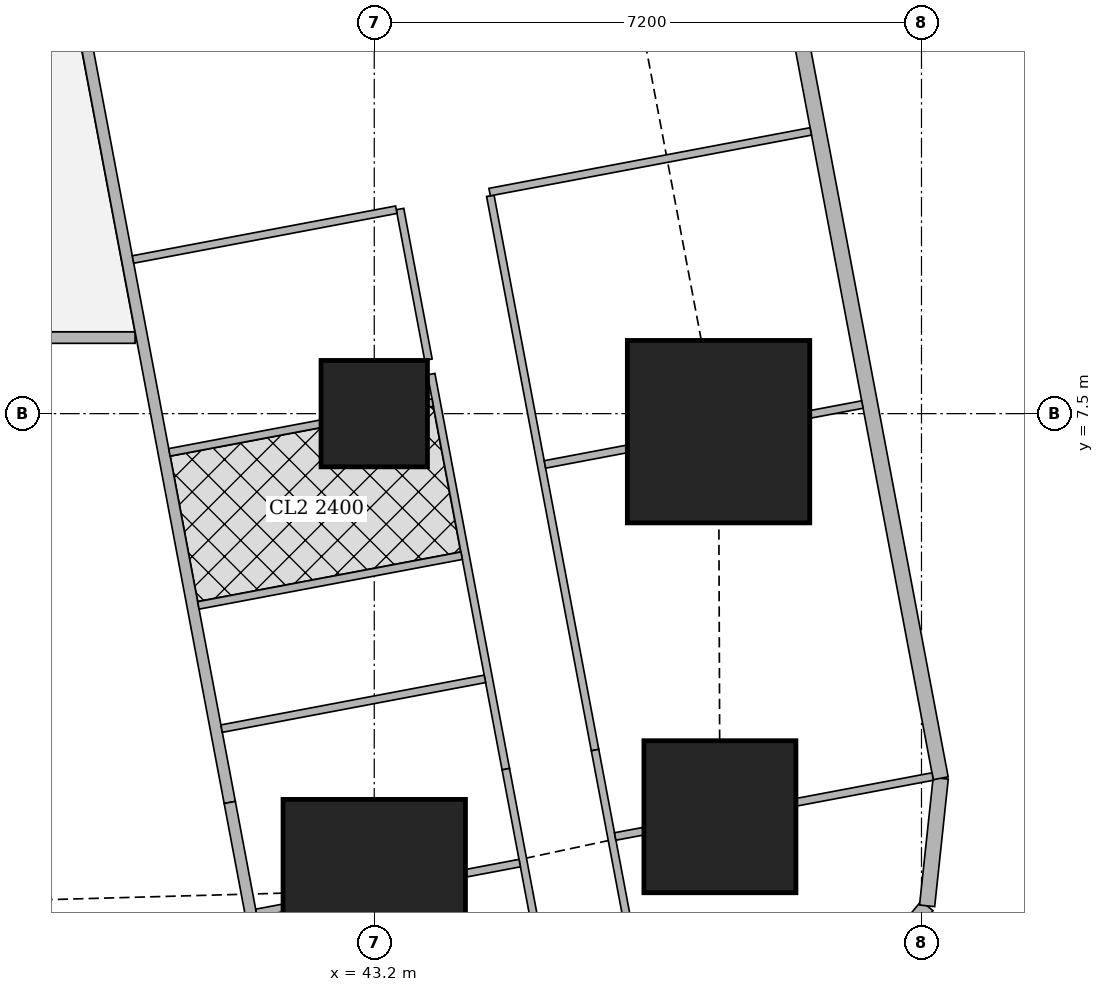
"""IFC4 building model, lengths in metres.
Left out: names, types, materials, properties, quantities, classifications, styles, units other than length and angle.
Written with IfcOpenShell. Run it as: python <this file> out.ifc"""

import sys

from ifc_helpers import new_model, si_unit, direction, frame, frame_2d, origin, origin_2d, place, context, subcontext, project, spatial, rectangle, extrude, element, fill, save


model = new_model("IFC4")
c1 = context("Model", 3, precision=1e-05, world=origin(), true_north=direction((0.0, 1.0)))
c2 = subcontext(c1, "Body", "Model", "MODEL_VIEW")
j1 = project(units=[si_unit("LENGTHUNIT", "METRE"), si_unit("PLANEANGLEUNIT", "RADIAN")], contexts=[c1])
p1 = place(None, origin())
s1 = spatial("IfcSite", under=j1, at=p1, CompositionType="ELEMENT")
p2 = place(p1, origin())
s2 = spatial("IfcBuilding", under=s1, at=p2, CompositionType="ELEMENT")
p3 = place(p2, frame((0.0, 0.0, 204.95)))
s3 = spatial("IfcBuildingStorey", under=s2, at=p3, CompositionType="ELEMENT", Elevation=204.95)
p4 = place(p3, frame((43.2, 1.225, 0.0), z_axis=(0.0, 0.0, 1.0), x_axis=(1.0, 0.0, 0.0)))
e1 = element("IfcColumn", 1, at=p4, inside=s3, PredefinedType="COLUMN", context=c2, shape_type="SweptSolid", body=[
    extrude(rectangle(XDim=2.4, YDim=2.4, at=origin_2d()), origin(), (0.0, 0.0, 1.0), 3.75),
])
p5 = place(p3, frame((47.748, 2.197, 0.0), z_axis=(0.0, 0.0, 1.0), x_axis=(1.0, 0.0, 0.0)))
e2 = element("IfcColumn", 2, at=p5, inside=s3, PredefinedType="COLUMN", context=c2, shape_type="SweptSolid", body=[
    extrude(rectangle(XDim=2.0, YDim=2.0, at=origin_2d()), origin(), (0.0, 0.0, 1.0), 3.75),
])
p6 = place(p3, frame((43.2, 7.5, 0.0), z_axis=(0.0, 0.0, 1.0), x_axis=(1.0, 0.0, 0.0)))
e3 = element("IfcColumn", 3, at=p6, inside=s3, PredefinedType="COLUMN", context=c2, shape_type="SweptSolid", body=[
    extrude(rectangle(XDim=1.4, YDim=1.4, at=origin_2d()), origin(), (0.0, 0.0, 1.0), 3.75),
])
p7 = place(p3, frame((47.73, 7.263, 0.0), z_axis=(0.0, 0.0, 1.0), x_axis=(1.0, 0.0, 0.0)))
e4 = element("IfcColumn", 4, at=p7, inside=s3, PredefinedType="COLUMN", context=c2, shape_type="SweptSolid", body=[
    extrude(rectangle(XDim=2.4, YDim=2.4, at=origin_2d()), origin(), (0.0, 0.0, 1.0), 3.75),
])
p8 = place(p3, frame((49.407, -0.263, 0.0), z_axis=(0.0, 0.0, 1.0), x_axis=(0.638042593423, 0.770001070764, 0.0)))
e5 = element("IfcWall", 5, at=p8, inside=s3, PredefinedType="SOLIDWALL", context=c2, shape_type="SweptSolid", body=[
    extrude(rectangle(XDim=1.673, YDim=0.2, at=frame_2d((0.836, 0.0))), origin(), (0.0, 0.0, 1.0), 3.5),
])
p9 = place(p3, frame((50.474, 1.025, 0.0), z_axis=(0.0, 0.0, 1.0), x_axis=(0.106047815515, 0.994361031429, 0.0)))
e6 = element("IfcWall", 6, at=p9, inside=s3, PredefinedType="SOLIDWALL", context=c2, shape_type="SweptSolid", body=[
    extrude(rectangle(XDim=1.688, YDim=0.2, at=frame_2d((0.844, 0.0))), origin(), (0.0, 0.0, 1.0), 3.5),
])
p10 = place(p3, frame((50.653, 2.703, 0.0), z_axis=(0.0, 0.0, 1.0), x_axis=(-0.185612026696, 0.982623109613, 0.0)))
e7 = element("IfcWall", 7, at=p10, inside=s3, PredefinedType="SOLIDWALL", context=c2, shape_type="SweptSolid", body=[
    extrude(rectangle(XDim=41.393, YDim=0.2, at=frame_2d((20.697, 0.0))), origin(), (0.0, 0.0, 1.0), 3.5),
])
p11 = place(p10, frame((1.633, 0.0, 0.9)))
e8 = element("IfcOpeningElement", 8, at=p11, cuts=e7, PredefinedType="OPENING", context=c2, shape_type="SweptSolid", body=[
    extrude(rectangle(XDim=1.8, YDim=1.5, at=frame_2d((0.9, 0.75))), frame((0.0, 0.11, 0.0), z_axis=(0.0, -1.0, 0.0), x_axis=(1.0, 0.0, 0.0)), (0.0, 0.0, 1.0), 0.22),
])
p12 = place(p10, frame((6.032, 0.0, 0.9)))
e9 = element("IfcOpeningElement", 9, at=p12, cuts=e7, PredefinedType="OPENING", context=c2, shape_type="SweptSolid", body=[
    extrude(rectangle(XDim=1.8, YDim=1.5, at=frame_2d((0.9, 0.75))), frame((0.0, 0.11, 0.0), z_axis=(0.0, -1.0, 0.0), x_axis=(1.0, 0.0, 0.0)), (0.0, 0.0, 1.0), 0.22),
])
p13 = place(p10, frame((9.848, 0.0, 0.9)))
e10 = element("IfcOpeningElement", 10, at=p13, cuts=e7, PredefinedType="OPENING", context=c2, shape_type="SweptSolid", body=[
    extrude(rectangle(XDim=1.8, YDim=1.5, at=frame_2d((0.9, 0.75))), frame((0.0, 0.11, 0.0), z_axis=(0.0, -1.0, 0.0), x_axis=(1.0, 0.0, 0.0)), (0.0, 0.0, 1.0), 0.22),
])
p14 = place(p10, frame((13.664, 0.0, 0.9)))
e11 = element("IfcOpeningElement", 11, at=p14, cuts=e7, PredefinedType="OPENING", context=c2, shape_type="SweptSolid", body=[
    extrude(rectangle(XDim=1.8, YDim=1.5, at=frame_2d((0.9, 0.75))), frame((0.0, 0.11, 0.0), z_axis=(0.0, -1.0, 0.0), x_axis=(1.0, 0.0, 0.0)), (0.0, 0.0, 1.0), 0.22),
])
p15 = place(p10, frame((17.481, 0.0, 0.9)))
e12 = element("IfcOpeningElement", 12, at=p15, cuts=e7, PredefinedType="OPENING", context=c2, shape_type="SweptSolid", body=[
    extrude(rectangle(XDim=1.8, YDim=1.5, at=frame_2d((0.9, 0.75))), frame((0.0, 0.11, 0.0), z_axis=(0.0, -1.0, 0.0), x_axis=(1.0, 0.0, 0.0)), (0.0, 0.0, 1.0), 0.22),
])
p16 = place(p10, frame((21.297, 0.0, 0.9)))
e13 = element("IfcOpeningElement", 13, at=p16, cuts=e7, PredefinedType="OPENING", context=c2, shape_type="SweptSolid", body=[
    extrude(rectangle(XDim=1.8, YDim=1.5, at=frame_2d((0.9, 0.75))), frame((0.0, 0.11, 0.0), z_axis=(0.0, -1.0, 0.0), x_axis=(1.0, 0.0, 0.0)), (0.0, 0.0, 1.0), 0.22),
])
p17 = place(p10, frame((25.113, 0.0, 0.9)))
e14 = element("IfcOpeningElement", 14, at=p17, cuts=e7, PredefinedType="OPENING", context=c2, shape_type="SweptSolid", body=[
    extrude(rectangle(XDim=1.8, YDim=1.5, at=frame_2d((0.9, 0.75))), frame((0.0, 0.11, 0.0), z_axis=(0.0, -1.0, 0.0), x_axis=(1.0, 0.0, 0.0)), (0.0, 0.0, 1.0), 0.22),
])
p18 = place(p10, frame((28.93, 0.0, 0.9)))
e15 = element("IfcOpeningElement", 15, at=p18, cuts=e7, PredefinedType="OPENING", context=c2, shape_type="SweptSolid", body=[
    extrude(rectangle(XDim=1.8, YDim=1.5, at=frame_2d((0.9, 0.75))), frame((0.0, 0.11, 0.0), z_axis=(0.0, -1.0, 0.0), x_axis=(1.0, 0.0, 0.0)), (0.0, 0.0, 1.0), 0.22),
])
p19 = place(p10, frame((32.746, 0.0, 0.9)))
e16 = element("IfcOpeningElement", 16, at=p19, cuts=e7, PredefinedType="OPENING", context=c2, shape_type="SweptSolid", body=[
    extrude(rectangle(XDim=1.8, YDim=1.5, at=frame_2d((0.9, 0.75))), frame((0.0, 0.11, 0.0), z_axis=(0.0, -1.0, 0.0), x_axis=(1.0, 0.0, 0.0)), (0.0, 0.0, 1.0), 0.22),
])
p20 = place(p10, frame((36.481, 0.0, 0.9)))
e17 = element("IfcOpeningElement", 17, at=p20, cuts=e7, PredefinedType="OPENING", context=c2, shape_type="SweptSolid", body=[
    extrude(rectangle(XDim=1.8, YDim=1.5, at=frame_2d((0.9, 0.75))), frame((0.0, 0.11, 0.0), z_axis=(0.0, -1.0, 0.0), x_axis=(1.0, 0.0, 0.0)), (0.0, 0.0, 1.0), 0.22),
])
p21 = place(p3, frame((40.053, 8.5, 0.0), z_axis=(0.0, 0.0, 1.0), x_axis=(-1.0, 0.0, 0.0)))
e18 = element("IfcWall", 18, at=p21, inside=s3, PredefinedType="SOLIDWALL", context=c2, shape_type="SweptSolid", body=[
    extrude(rectangle(XDim=31.052, YDim=0.15, at=frame_2d((15.526, 0.0))), origin(), (0.0, 0.0, 1.0), 3.5),
])
p22 = place(p21, frame((29.178, 0.0, 0.0)))
e19 = element("IfcOpeningElement", 19, at=p22, cuts=e18, PredefinedType="OPENING", context=c2, shape_type="SweptSolid", body=[
    extrude(rectangle(XDim=1.0, YDim=2.1, at=frame_2d((0.5, 1.05))), frame((0.0, 0.085, 0.0), z_axis=(0.0, -1.0, 0.0), x_axis=(1.0, 0.0, 0.0)), (0.0, 0.0, 1.0), 0.17),
])
p23 = place(p21, frame((19.953, 0.0, 0.0)))
e20 = element("IfcOpeningElement", 20, at=p23, cuts=e18, PredefinedType="OPENING", context=c2, shape_type="SweptSolid", body=[
    extrude(rectangle(XDim=1.0, YDim=2.1, at=frame_2d((0.5, 1.05))), frame((0.0, 0.085, 0.0), z_axis=(0.0, -1.0, 0.0), x_axis=(1.0, 0.0, 0.0)), (0.0, 0.0, 1.0), 0.17),
])
p24 = place(p21, frame((12.753, 0.0, 0.0)))
e21 = element("IfcOpeningElement", 21, at=p24, cuts=e18, PredefinedType="OPENING", context=c2, shape_type="SweptSolid", body=[
    extrude(rectangle(XDim=1.0, YDim=2.1, at=frame_2d((0.5, 1.05))), frame((0.0, 0.085, 0.0), z_axis=(0.0, -1.0, 0.0), x_axis=(1.0, 0.0, 0.0)), (0.0, 0.0, 1.0), 0.17),
])
p25 = place(p21, frame((0.15, 0.0, 0.0)))
e22 = element("IfcOpeningElement", 22, at=p25, cuts=e18, PredefinedType="OPENING", context=c2, shape_type="SweptSolid", body=[
    extrude(rectangle(XDim=1.0, YDim=2.1, at=frame_2d((0.5, 1.05))), frame((0.0, 0.085, 0.0), z_axis=(0.0, -1.0, 0.0), x_axis=(1.0, 0.0, 0.0)), (0.0, 0.0, 1.0), 0.17),
])
p26 = place(p3, frame((33.68, 42.723, 0.0), z_axis=(0.0, 0.0, 1.0), x_axis=(0.185601160014, -0.982625162207, 0.0)))
e23 = element("IfcWall", 23, at=p26, inside=s3, PredefinedType="SOLIDWALL", context=c2, shape_type="SweptSolid", body=[
    extrude(rectangle(XDim=41.051, YDim=0.15, at=frame_2d((20.526, 0.0))), origin(), (0.0, 0.0, 1.0), 2.5),
])
p27 = place(p26, frame((12.307, 0.0, 0.0)))
e24 = element("IfcOpeningElement", 24, at=p27, cuts=e23, PredefinedType="OPENING", context=c2, shape_type="SweptSolid", body=[
    extrude(rectangle(XDim=1.0, YDim=2.1, at=frame_2d((0.5, 1.05))), frame((0.0, 0.085, 0.0), z_axis=(0.0, -1.0, 0.0), x_axis=(1.0, 0.0, 0.0)), (0.0, 0.0, 1.0), 0.17),
])
p28 = place(p26, frame((16.123, 0.0, 0.0)))
e25 = element("IfcOpeningElement", 25, at=p28, cuts=e23, PredefinedType="OPENING", context=c2, shape_type="SweptSolid", body=[
    extrude(rectangle(XDim=1.0, YDim=2.1, at=frame_2d((0.5, 1.05))), frame((0.0, 0.085, 0.0), z_axis=(0.0, -1.0, 0.0), x_axis=(1.0, 0.0, 0.0)), (0.0, 0.0, 1.0), 0.17),
])
p29 = place(p26, frame((30.902, 0.0, 0.0)))
e26 = element("IfcOpeningElement", 26, at=p29, cuts=e23, PredefinedType="OPENING", context=c2, shape_type="SweptSolid", body=[
    extrude(rectangle(XDim=1.0, YDim=2.1, at=frame_2d((0.5, 1.05))), frame((0.0, 0.085, 0.0), z_axis=(0.0, -1.0, 0.0), x_axis=(1.0, 0.0, 0.0)), (0.0, 0.0, 1.0), 0.17),
])
p30 = place(p3, frame((41.299, 2.385, 0.0), z_axis=(0.0, 0.0, 1.0), x_axis=(0.18529731833, -0.982682504077, 0.0)))
e27 = element("IfcWall", 27, at=p30, inside=s3, PredefinedType="SOLIDWALL", context=c2, shape_type="SweptSolid", body=[
    extrude(rectangle(XDim=2.455, YDim=0.15, at=frame_2d((1.227, 0.0))), origin(), (0.0, 0.0, 1.0), 2.05),
])
p31 = place(p3, frame((44.727, 10.366, 0.0), z_axis=(0.0, 0.0, 1.0), x_axis=(0.185678775129, -0.982610498858, 0.0)))
e28 = element("IfcWall", 28, at=p31, inside=s3, PredefinedType="PARTITIONING", context=c2, shape_type="SweptSolid", body=[
    extrude(rectangle(XDim=7.421, YDim=0.1, at=frame_2d((3.71, 0.0))), origin(), (0.0, 0.0, 1.0), 3.5),
])
p32 = place(p31, frame((0.151, 0.0, 0.0)))
e29 = element("IfcOpeningElement", 29, at=p32, cuts=e28, PredefinedType="OPENING", context=c2, shape_type="SweptSolid", body=[
    extrude(rectangle(XDim=0.9, YDim=2.1, at=frame_2d((0.45, 1.05))), frame((0.0, 0.06, 0.0), z_axis=(0.0, -1.0, 0.0), x_axis=(1.0, 0.0, 0.0)), (0.0, 0.0, 1.0), 0.12),
])
p33 = place(p31, frame((4.65, 0.0, 0.0)))
e30 = element("IfcOpeningElement", 30, at=p33, cuts=e28, PredefinedType="OPENING", context=c2, shape_type="SweptSolid", body=[
    extrude(rectangle(XDim=0.9, YDim=2.1, at=frame_2d((0.45, 1.05))), frame((0.0, 0.06, 0.0), z_axis=(0.0, -1.0, 0.0), x_axis=(1.0, 0.0, 0.0)), (0.0, 0.0, 1.0), 0.12),
])
p34 = place(p3, frame((46.105, 3.074, 0.0), z_axis=(0.0, 0.0, 1.0), x_axis=(0.185631845838, -0.982619365681, 0.0)))
e31 = element("IfcWall", 31, at=p34, inside=s3, PredefinedType="PARTITIONING", context=c2, shape_type="SweptSolid", body=[
    extrude(rectangle(XDim=2.403, YDim=0.1, at=frame_2d((1.201, 0.0))), origin(), (0.0, 0.0, 1.0), 2.05),
])
p35 = place(p3, frame((43.539, 10.192, 0.0), z_axis=(0.0, 0.0, 1.0), x_axis=(0.185443145218, -0.982654995353, 0.0)))
e32 = element("IfcWall", 32, at=p35, inside=s3, PredefinedType="PARTITIONING", context=c2, shape_type="SweptSolid", body=[
    extrude(rectangle(XDim=2.017, YDim=0.1, at=frame_2d((1.008, 0.0))), origin(), (0.0, 0.0, 1.0), 3.5),
])
p36 = place(p3, frame((43.949, 8.02, 0.0), z_axis=(0.0, 0.0, 1.0), x_axis=(0.185656792073, -0.982614652627, 0.0)))
e33 = element("IfcWall", 33, at=p36, inside=s3, PredefinedType="PARTITIONING", context=c2, shape_type="SweptSolid", body=[
    extrude(rectangle(XDim=5.289, YDim=0.1, at=frame_2d((2.645, 0.0))), origin(), (0.0, 0.0, 1.0), 3.5),
])
p37 = place(p36, frame((1.2, 0.0, 0.0)))
e34 = element("IfcOpeningElement", 34, at=p37, cuts=e33, PredefinedType="OPENING", context=c2, shape_type="SweptSolid", body=[
    extrude(rectangle(XDim=0.9, YDim=2.1, at=frame_2d((0.45, 1.05))), frame((0.0, 0.06, 0.0), z_axis=(0.0, -1.0, 0.0), x_axis=(1.0, 0.0, 0.0)), (0.0, 0.0, 1.0), 0.12),
])
p38 = place(p36, frame((2.855, 0.0, 0.0)))
e35 = element("IfcOpeningElement", 35, at=p38, cuts=e33, PredefinedType="OPENING", context=c2, shape_type="SweptSolid", body=[
    extrude(rectangle(XDim=0.9, YDim=2.1, at=frame_2d((0.45, 1.05))), frame((0.0, 0.06, 0.0), z_axis=(0.0, -1.0, 0.0), x_axis=(1.0, 0.0, 0.0)), (0.0, 0.0, 1.0), 0.12),
])
p39 = place(p3, frame((44.931, 2.823, 0.0), z_axis=(0.0, 0.0, 1.0), x_axis=(0.185631845838, -0.982619365681, 0.0)))
e36 = element("IfcWall", 36, at=p39, inside=s3, PredefinedType="PARTITIONING", context=c2, shape_type="SweptSolid", body=[
    extrude(rectangle(XDim=2.403, YDim=0.1, at=frame_2d((1.201, 0.0))), origin(), (0.0, 0.0, 1.0), 2.05),
])
p40 = place(p3, frame((48.943, 11.213, 0.0), z_axis=(0.0, 0.0, 1.0), x_axis=(-0.982633535512, -0.185556823879, 0.0)))
e37 = element("IfcWall", 37, at=p40, inside=s3, PredefinedType="PARTITIONING", context=c2, shape_type="SweptSolid", body=[
    extrude(rectangle(XDim=4.3, YDim=0.1, at=frame_2d((2.15, 0.0))), origin(), (0.0, 0.0, 1.0), 2.05),
])
p41 = place(p3, frame((49.622, 7.62, 0.0), z_axis=(0.0, 0.0, 1.0), x_axis=(-0.98254419619, -0.186029305578, 0.0)))
e38 = element("IfcWall", 38, at=p41, inside=s3, PredefinedType="PARTITIONING", context=c2, shape_type="SweptSolid", body=[
    extrude(rectangle(XDim=0.694, YDim=0.1, at=frame_2d((0.347, 0.0))), origin(), (0.0, 0.0, 1.0), 3.5),
])
p42 = place(p3, frame((46.52, 7.035, 0.0), z_axis=(0.0, 0.0, 1.0), x_axis=(-0.982620932907, -0.185623549726, 0.0)))
e39 = element("IfcWall", 39, at=p42, inside=s3, PredefinedType="PARTITIONING", context=c2, shape_type="SweptSolid", body=[
    extrude(rectangle(XDim=1.093, YDim=0.1, at=frame_2d((0.546, 0.0))), origin(), (0.0, 0.0, 1.0), 3.5),
])
p43 = place(p3, frame((50.547, 2.726, 0.0), z_axis=(0.0, 0.0, 1.0), x_axis=(-0.982603988143, -0.185713226471, 0.0)))
e40 = element("IfcWall", 40, at=p43, inside=s3, PredefinedType="PARTITIONING", context=c2, shape_type="SweptSolid", body=[
    extrude(rectangle(XDim=1.821, YDim=0.1, at=frame_2d((0.91, 0.0))), origin(), (0.0, 0.0, 1.0), 2.05),
])
p44 = place(p3, frame((46.738, 2.006, 0.0), z_axis=(0.0, 0.0, 1.0), x_axis=(-0.982820466874, -0.184564161994, 0.0)))
e41 = element("IfcWall", 41, at=p44, inside=s3, PredefinedType="PARTITIONING", context=c2, shape_type="SweptSolid", body=[
    extrude(rectangle(XDim=0.374, YDim=0.1, at=frame_2d((0.187, 0.0))), origin(), (0.0, 0.0, 1.0), 2.05),
])
p45 = place(p3, frame((43.49, 10.183, 0.0), z_axis=(0.0, 0.0, 1.0), x_axis=(-0.982588017646, -0.185797706064, 0.0)))
e42 = element("IfcWall", 42, at=p45, inside=s3, PredefinedType="PARTITIONING", context=c2, shape_type="SweptSolid", body=[
    extrude(rectangle(XDim=3.525, YDim=0.1, at=frame_2d((1.763, 0.0))), origin(), (0.0, 0.0, 1.0), 3.5),
])
p46 = place(p45, frame((1.325, 0.0, 0.0)))
e43 = element("IfcOpeningElement", 43, at=p46, cuts=e42, PredefinedType="OPENING", context=c2, shape_type="SweptSolid", body=[
    extrude(rectangle(XDim=0.9, YDim=2.1, at=frame_2d((0.45, 1.05))), frame((0.0, 0.06, 0.0), z_axis=(0.0, -1.0, 0.0), x_axis=(1.0, 0.0, 0.0)), (0.0, 0.0, 1.0), 0.12),
])
p47 = place(p3, frame((43.969, 7.646, 0.0), z_axis=(0.0, 0.0, 1.0), x_axis=(-0.983147034646, -0.182816597351, 0.0)))
e44 = element("IfcWall", 44, at=p47, inside=s3, PredefinedType="PARTITIONING", context=c2, shape_type="SweptSolid", body=[
    extrude(rectangle(XDim=0.06, YDim=0.1, at=frame_2d((0.03, 0.0))), origin(), (0.0, 0.0, 1.0), 3.5),
])
p48 = place(p3, frame((42.49, 7.366, 0.0), z_axis=(0.0, 0.0, 1.0), x_axis=(-0.982620917875, -0.185623629302, 0.0)))
e45 = element("IfcWall", 45, at=p48, inside=s3, PredefinedType="PARTITIONING", context=c2, shape_type="SweptSolid", body=[
    extrude(rectangle(XDim=2.02, YDim=0.1, at=frame_2d((1.01, 0.0))), origin(), (0.0, 0.0, 1.0), 3.5),
])
p49 = place(p3, frame((45.114, 1.587, 0.0), z_axis=(0.0, 0.0, 1.0), x_axis=(-0.982671022916, -0.185358195723, 0.0)))
e46 = element("IfcWall", 46, at=p49, inside=s3, PredefinedType="PARTITIONING", context=c2, shape_type="SweptSolid", body=[
    extrude(rectangle(XDim=0.717, YDim=0.1, at=frame_2d((0.358, 0.0))), origin(), (0.0, 0.0, 1.0), 2.05),
])
p50 = place(p3, frame((41.99, 0.996, 0.0), z_axis=(0.0, 0.0, 1.0), x_axis=(-0.982639822555, -0.185523527159, 0.0)))
e47 = element("IfcWall", 47, at=p50, inside=s3, PredefinedType="PARTITIONING", context=c2, shape_type="SweptSolid", body=[
    extrude(rectangle(XDim=0.346, YDim=0.1, at=frame_2d((0.173, 0.0))), origin(), (0.0, 0.0, 1.0), 2.05),
])
p51 = place(p3, frame((44.35, 5.631, 0.0), z_axis=(0.0, 0.0, 1.0), x_axis=(-0.982638553676, -0.185530247748, 0.0)))
e48 = element("IfcWall", 48, at=p51, inside=s3, PredefinedType="PARTITIONING", context=c2, shape_type="SweptSolid", body=[
    extrude(rectangle(XDim=3.525, YDim=0.1, at=frame_2d((1.763, 0.0))), origin(), (0.0, 0.0, 1.0), 3.5),
])
p52 = place(p3, frame((41.192, 3.356, 0.0), z_axis=(0.0, 0.0, 1.0), x_axis=(0.982588017646, 0.185797706064, 0.0)))
e49 = element("IfcWall", 49, at=p52, inside=s3, PredefinedType="PARTITIONING", context=c2, shape_type="SweptSolid", body=[
    extrude(rectangle(XDim=3.525, YDim=0.1, at=frame_2d((1.763, 0.0))), origin(), (0.0, 0.0, 1.0), 3.5),
])
p53 = place(p52, frame((1.7, 0.0, 0.0)))
e50 = element("IfcOpeningElement", 50, at=p53, cuts=e49, PredefinedType="OPENING", context=c2, shape_type="SweptSolid", body=[
    extrude(rectangle(XDim=0.9, YDim=2.1, at=frame_2d((0.45, 1.05))), frame((0.0, 0.06, 0.0), z_axis=(0.0, -1.0, 0.0), x_axis=(1.0, 0.0, 0.0)), (0.0, 0.0, 1.0), 0.12),
])
p54 = place(p11, origin())
e51 = element("IfcWindow", 51, at=p54, inside=s3, PartitioningType="SINGLE_PANEL", PredefinedType="WINDOW", context=c2, shape_type="SweptSolid", body=[
    extrude(rectangle(XDim=1.8, YDim=1.5, at=frame_2d((0.9, 0.75))), frame((0.0, 0.03, 0.0), z_axis=(0.0, -1.0, 0.0), x_axis=(1.0, 0.0, 0.0)), (0.0, 0.0, 1.0), 0.06),
])
fill(e8, e51)
p55 = place(p12, origin())
e52 = element("IfcWindow", 52, at=p55, inside=s3, PartitioningType="SINGLE_PANEL", PredefinedType="WINDOW", context=c2, shape_type="SweptSolid", body=[
    extrude(rectangle(XDim=1.8, YDim=1.5, at=frame_2d((0.9, 0.75))), frame((0.0, 0.03, 0.0), z_axis=(0.0, -1.0, 0.0), x_axis=(1.0, 0.0, 0.0)), (0.0, 0.0, 1.0), 0.06),
])
fill(e9, e52)
p56 = place(p25, origin())
e53 = element("IfcDoor", 53, at=p56, inside=s3, OperationType="SINGLE_SWING_LEFT", PredefinedType="DOOR", context=c2, shape_type="SweptSolid", body=[
    extrude(rectangle(XDim=1.0, YDim=2.1, at=frame_2d((0.5, 1.05))), frame((0.0, 0.025, 0.0), z_axis=(0.0, -1.0, 0.0), x_axis=(1.0, 0.0, 0.0)), (0.0, 0.0, 1.0), 0.05),
])
fill(e22, e53)
p57 = place(p32, origin())
e54 = element("IfcDoor", 54, at=p57, inside=s3, OperationType="SINGLE_SWING_LEFT", PredefinedType="DOOR", context=c2, shape_type="SweptSolid", body=[
    extrude(rectangle(XDim=0.9, YDim=2.1, at=frame_2d((0.45, 1.05))), frame((0.0, 0.025, 0.0), z_axis=(0.0, -1.0, 0.0), x_axis=(1.0, 0.0, 0.0)), (0.0, 0.0, 1.0), 0.05),
])
fill(e29, e54)
p58 = place(p33, origin())
e55 = element("IfcDoor", 55, at=p58, inside=s3, OperationType="SINGLE_SWING_LEFT", PredefinedType="DOOR", context=c2, shape_type="SweptSolid", body=[
    extrude(rectangle(XDim=0.9, YDim=2.1, at=frame_2d((0.45, 1.05))), frame((0.0, 0.025, 0.0), z_axis=(0.0, -1.0, 0.0), x_axis=(1.0, 0.0, 0.0)), (0.0, 0.0, 1.0), 0.05),
])
fill(e30, e55)
p59 = place(p37, origin())
e56 = element("IfcDoor", 56, at=p59, inside=s3, OperationType="SINGLE_SWING_LEFT", PredefinedType="DOOR", context=c2, shape_type="SweptSolid", body=[
    extrude(rectangle(XDim=0.9, YDim=2.1, at=frame_2d((0.45, 1.05))), frame((0.0, 0.025, 0.0), z_axis=(0.0, -1.0, 0.0), x_axis=(1.0, 0.0, 0.0)), (0.0, 0.0, 1.0), 0.05),
])
fill(e34, e56)
p60 = place(p38, origin())
e57 = element("IfcDoor", 57, at=p60, inside=s3, OperationType="SINGLE_SWING_LEFT", PredefinedType="DOOR", context=c2, shape_type="SweptSolid", body=[
    extrude(rectangle(XDim=0.9, YDim=2.1, at=frame_2d((0.45, 1.05))), frame((0.0, 0.025, 0.0), z_axis=(0.0, -1.0, 0.0), x_axis=(1.0, 0.0, 0.0)), (0.0, 0.0, 1.0), 0.05),
])
fill(e35, e57)
p61 = place(p29, origin())
e58 = element("IfcDoor", 58, at=p61, inside=s3, OperationType="SINGLE_SWING_LEFT", PredefinedType="DOOR", context=c2, shape_type="SweptSolid", body=[
    extrude(rectangle(XDim=1.0, YDim=2.1, at=frame_2d((0.5, 1.05))), frame((0.0, 0.025, 0.0), z_axis=(0.0, -1.0, 0.0), x_axis=(1.0, 0.0, 0.0)), (0.0, 0.0, 1.0), 0.05),
])
fill(e26, e58)
p62 = place(p46, origin())
e59 = element("IfcDoor", 59, at=p62, inside=s3, OperationType="SINGLE_SWING_LEFT", PredefinedType="DOOR", context=c2, shape_type="SweptSolid", body=[
    extrude(rectangle(XDim=0.9, YDim=2.1, at=frame_2d((0.45, 1.05))), frame((0.0, 0.025, 0.0), z_axis=(0.0, -1.0, 0.0), x_axis=(1.0, 0.0, 0.0)), (0.0, 0.0, 1.0), 0.05),
])
fill(e43, e59)
p63 = place(p53, origin())
e60 = element("IfcDoor", 60, at=p63, inside=s3, OperationType="SINGLE_SWING_RIGHT", PredefinedType="DOOR", context=c2, shape_type="SweptSolid", body=[
    extrude(rectangle(XDim=0.9, YDim=2.1, at=frame_2d((0.45, 1.05))), frame((0.0, 0.025, 0.0), z_axis=(0.0, -1.0, 0.0), x_axis=(1.0, 0.0, 0.0)), (0.0, 0.0, 1.0), 0.05),
])
fill(e50, e60)
save(model, sys.argv[1])
